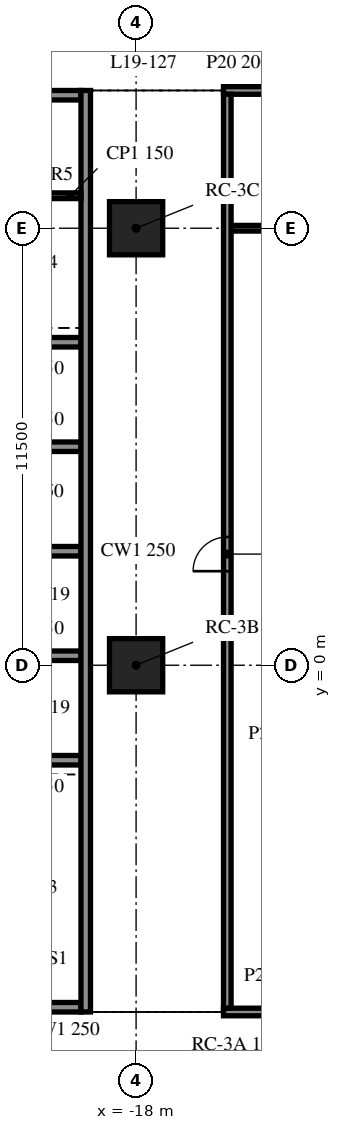
"""IFC4 building model, lengths in metres.
Left out: names, types, materials, properties, quantities, classifications, styles, units other than length and angle.
Written with IfcOpenShell. Run it as: python <this file> out.ifc"""

import sys

from ifc_helpers import new_model, si_unit, direction, frame, frame_2d, origin, origin_2d, place, context, subcontext, project, spatial, rectangle, extrude, element, fill, save


model = new_model("IFC4")
c1 = context("Model", 3, precision=1e-05, world=origin(), true_north=direction((0.0, 1.0)))
c2 = subcontext(c1, "Body", "Model", "MODEL_VIEW")
j1 = project(units=[si_unit("LENGTHUNIT", "METRE"), si_unit("PLANEANGLEUNIT", "RADIAN")], contexts=[c1])
p1 = place(None, origin())
s1 = spatial("IfcSite", under=j1, at=p1, CompositionType="ELEMENT")
p2 = place(p1, origin())
s2 = spatial("IfcBuilding", under=s1, at=p2, CompositionType="ELEMENT")
p3 = place(p2, frame((0.0, 0.0, 84.8)))
s3 = spatial("IfcBuildingStorey", under=s2, at=p3, CompositionType="ELEMENT", Elevation=84.8)
for number, where, z_axis, x_axis in (
    (1, (-18.0, 0.0, -0.34), (0.0, 0.0, 1.0), (1.0, 0.0, 0.0)),
    (2, (-18.0, 11.5, -0.34), (0.0, 0.0, 1.0), (1.0, 0.0, 0.0)),
):
    element("IfcColumn", number, at=place(p3, frame(where, z_axis=z_axis, x_axis=x_axis)), inside=s3, PredefinedType="COLUMN", context=c2, shape_type="SweptSolid", body=[
        extrude(rectangle(XDim=1.4, YDim=1.4, at=origin_2d()), origin(), (0.0, 0.0, 1.0), 4.1),
    ])
p4 = place(p3, frame((-19.325, -9.125, 0.0), z_axis=(0.0, 0.0, 1.0), x_axis=(0.0, 1.0, 0.0)))
e3 = element("IfcWall", 3, at=p4, inside=s3, PredefinedType="SOLIDWALL", context=c2, shape_type="SweptSolid", body=[
    extrude(rectangle(XDim=24.25, YDim=0.25, at=frame_2d((12.125, 0.0))), origin(), (0.0, 0.0, 1.0), 3.76),
])
p5 = place(p3, frame((-19.45, -9.0, 0.0), z_axis=(0.0, 0.0, 1.0), x_axis=(-1.0, 0.0, 0.0)))
e4 = element("IfcWall", 4, at=p5, inside=s3, PredefinedType="SOLIDWALL", context=c2, shape_type="SweptSolid", body=[
    extrude(rectangle(XDim=9.1, YDim=0.25, at=frame_2d((4.55, 0.0))), origin(), (0.0, 0.0, 1.0), 3.76),
])
p6 = place(p5, frame((3.65, 0.0, 0.0)))
e5 = element("IfcOpeningElement", 5, at=p6, cuts=e4, PredefinedType="OPENING", context=c2, shape_type="SweptSolid", body=[
    extrude(rectangle(XDim=1.8, YDim=2.1, at=frame_2d((0.9, 1.05))), frame((0.0, 0.135, 0.0), z_axis=(0.0, -1.0, 0.0), x_axis=(1.0, 0.0, 0.0)), (0.0, 0.0, 1.0), 0.27),
])
p7 = place(p3, frame((-28.55, 15.0, 0.0), z_axis=(0.0, 0.0, 1.0), x_axis=(1.0, 0.0, 0.0)))
e6 = element("IfcWall", 6, at=p7, inside=s3, PredefinedType="SOLIDWALL", context=c2, shape_type="SweptSolid", body=[
    extrude(rectangle(XDim=9.1, YDim=0.25, at=frame_2d((4.55, 0.0))), origin(), (0.0, 0.0, 1.0), 3.76),
])
p8 = place(p7, frame((3.65, 0.0, 0.0)))
e7 = element("IfcOpeningElement", 7, at=p8, cuts=e6, PredefinedType="OPENING", context=c2, shape_type="SweptSolid", body=[
    extrude(rectangle(XDim=1.8, YDim=2.1, at=frame_2d((0.9, 1.05))), frame((0.0, 0.135, 0.0), z_axis=(0.0, -1.0, 0.0), x_axis=(1.0, 0.0, 0.0)), (0.0, 0.0, 1.0), 0.27),
])
for number, where, z_axis, x_axis in (
    (8, (-22.3, -2.5, 0.0), (0.0, 0.0, 1.0), (1.0, 0.0, 0.0)),
    (9, (-22.3, 0.25, 0.0), (0.0, 0.0, 1.0), (1.0, 0.0, 0.0)),
    (10, (-22.3, 3.0, 0.0), (0.0, 0.0, 1.0), (1.0, 0.0, 0.0)),
    (11, (-22.3, 5.75, 0.0), (0.0, 0.0, 1.0), (1.0, 0.0, 0.0)),
    (12, (-22.3, 8.5, 0.0), (0.0, 0.0, 1.0), (1.0, 0.0, 0.0)),
):
    element("IfcWall", number, at=place(p3, frame(where, z_axis=z_axis, x_axis=x_axis)), inside=s3, PredefinedType="SOLIDWALL", context=c2, shape_type="SweptSolid", body=[
        extrude(rectangle(XDim=2.85, YDim=0.25, at=frame_2d((1.425, 0.0))), origin(), (0.0, 0.0, 1.0), 3.76),
    ])
p9 = place(p3, frame((-22.3, 12.355, 0.0), z_axis=(0.0, 0.0, 1.0), x_axis=(1.0, 0.0, 0.0)))
e13 = element("IfcWall", 13, at=p9, inside=s3, PredefinedType="PARTITIONING", context=c2, shape_type="SweptSolid", body=[
    extrude(rectangle(XDim=2.85, YDim=0.15, at=frame_2d((1.425, 0.0))), origin(), (0.0, 0.0, 1.0), 3.76),
])
p10 = place(p3, frame((-15.7, -9.125, 0.0), z_axis=(0.0, 0.0, 1.0), x_axis=(1.0, 0.0, 0.0)))
e14 = element("IfcWall", 14, at=p10, inside=s3, PredefinedType="PARTITIONING", context=c2, shape_type="SweptSolid", body=[
    extrude(rectangle(XDim=7.3, YDim=0.2, at=frame_2d((3.65, 0.0))), origin(), (0.0, 0.0, 1.0), 3.76),
])
p11 = place(p3, frame((-15.5, 11.5, 0.0), z_axis=(0.0, 0.0, 1.0), x_axis=(1.0, 0.0, 0.0)))
e15 = element("IfcWall", 15, at=p11, inside=s3, PredefinedType="PARTITIONING", context=c2, shape_type="SweptSolid", body=[
    extrude(rectangle(XDim=6.9, YDim=0.15, at=frame_2d((3.45, 0.0))), origin(), (0.0, 0.0, 1.0), 3.76),
])
p12 = place(p3, frame((-15.7, 15.125, 0.0), z_axis=(0.0, 0.0, 1.0), x_axis=(1.0, 0.0, 0.0)))
e16 = element("IfcWall", 16, at=p12, inside=s3, PredefinedType="PARTITIONING", context=c2, shape_type="SweptSolid", body=[
    extrude(rectangle(XDim=7.3, YDim=0.2, at=frame_2d((3.65, 0.0))), origin(), (0.0, 0.0, 1.0), 3.76),
])
p13 = place(p12, frame((3.1, 0.0, 0.0)))
e17 = element("IfcOpeningElement", 17, at=p13, cuts=e16, PredefinedType="OPENING", context=c2, shape_type="SweptSolid", body=[
    extrude(rectangle(XDim=0.9, YDim=2.1, at=frame_2d((0.45, 1.05))), frame((0.0, 0.11, 0.0), z_axis=(0.0, -1.0, 0.0), x_axis=(1.0, 0.0, 0.0)), (0.0, 0.0, 1.0), 0.22),
])
p14 = place(p3, frame((-15.6, -9.025, 0.0), z_axis=(0.0, 0.0, 1.0), x_axis=(0.0, 1.0, 0.0)))
e18 = element("IfcWall", 18, at=p14, inside=s3, PredefinedType="PARTITIONING", context=c2, shape_type="SweptSolid", body=[
    extrude(rectangle(XDim=24.05, YDim=0.2, at=frame_2d((12.025, 0.0))), origin(), (0.0, 0.0, 1.0), 3.76),
])
p15 = place(p14, frame((11.5, 0.0, 0.0)))
e19 = element("IfcOpeningElement", 19, at=p15, cuts=e18, PredefinedType="OPENING", context=c2, shape_type="SweptSolid", body=[
    extrude(rectangle(XDim=0.9, YDim=2.1, at=frame_2d((0.45, 1.05))), frame((0.0, 0.11, 0.0), z_axis=(0.0, -1.0, 0.0), x_axis=(1.0, 0.0, 0.0)), (0.0, 0.0, 1.0), 0.22),
])
p16 = place(p15, origin())
e20 = element("IfcDoor", 20, at=p16, inside=s3, OperationType="SINGLE_SWING_RIGHT", PredefinedType="DOOR", context=c2, shape_type="SweptSolid", body=[
    extrude(rectangle(XDim=0.9, YDim=2.1, at=frame_2d((0.45, 1.05))), frame((0.0, 0.025, 0.0), z_axis=(0.0, -1.0, 0.0), x_axis=(1.0, 0.0, 0.0)), (0.0, 0.0, 1.0), 0.05),
])
fill(e19, e20)
save(model, sys.argv[1])
